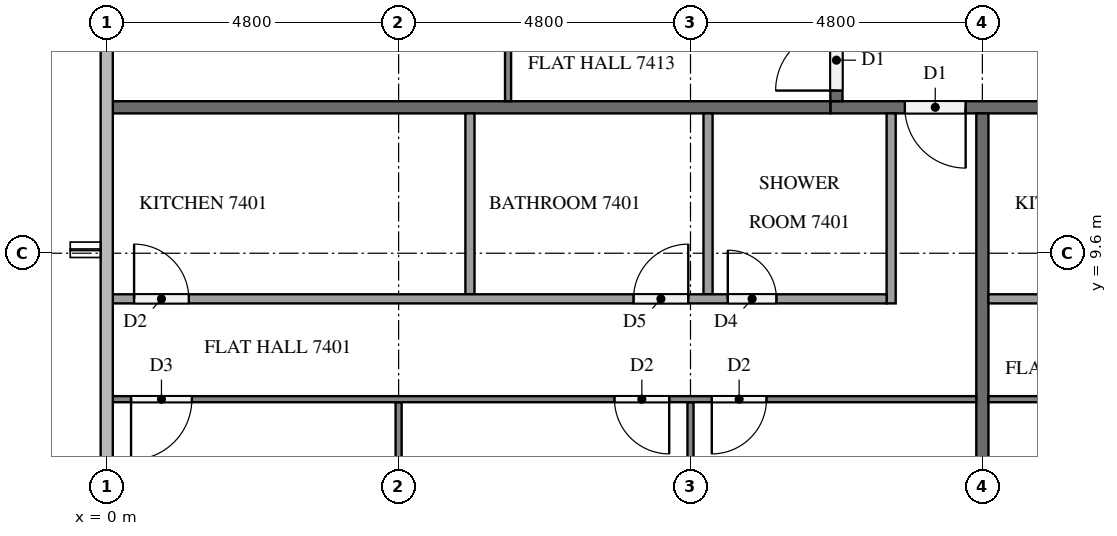
"""IFC4 building model, lengths in metres.
Left out: names, types, materials, properties, quantities, classifications, styles, units other than length and angle.
Written with IfcOpenShell. Run it as: python <this file> out.ifc"""

import sys

from ifc_helpers import new_model, si_unit, direction, frame, frame_2d, origin, place, context, subcontext, project, spatial, rectangle, extrude, element, fill, save


model = new_model("IFC4")
c1 = context("Model", 3, precision=1e-05, world=origin(), true_north=direction((0.0, 1.0)))
c2 = subcontext(c1, "Body", "Model", "MODEL_VIEW")
j1 = project(units=[si_unit("LENGTHUNIT", "METRE"), si_unit("PLANEANGLEUNIT", "RADIAN")], contexts=[c1])
p1 = place(None, origin())
s1 = spatial("IfcSite", under=j1, at=p1, CompositionType="ELEMENT")
p2 = place(p1, origin())
s2 = spatial("IfcBuilding", under=s1, at=p2, CompositionType="ELEMENT")
p3 = place(p2, frame((0.0, 0.0, 282.6)))
s3 = spatial("IfcBuildingStorey", under=s2, at=p3, CompositionType="ELEMENT", Elevation=282.6)
p4 = place(p3, frame((50.5, 12.0, 0.0), z_axis=(0.0, 0.0, 1.0), x_axis=(-1.0, 0.0, 0.0)))
e1 = element("IfcWall", 1, at=p4, inside=s3, PredefinedType="PARTITIONING", context=c2, shape_type="SweptSolid", body=[
    extrude(rectangle(XDim=38.6, YDim=0.2, at=frame_2d((19.3, 0.0))), origin(), (0.0, 0.0, 1.0), 3.2),
])
p5 = place(p4, frame((36.375, 0.0, 0.0)))
e2 = element("IfcOpeningElement", 2, at=p5, cuts=e1, PredefinedType="OPENING", context=c2, shape_type="SweptSolid", body=[
    extrude(rectangle(XDim=1.0, YDim=2.1, at=frame_2d((0.5, 1.05))), frame((0.0, 0.11, 0.0), z_axis=(0.0, -1.0, 0.0), x_axis=(1.0, 0.0, 0.0)), (0.0, 0.0, 1.0), 0.22),
])
p6 = place(p4, frame((29.175, 0.0, 0.0)))
e3 = element("IfcOpeningElement", 3, at=p6, cuts=e1, PredefinedType="OPENING", context=c2, shape_type="SweptSolid", body=[
    extrude(rectangle(XDim=1.0, YDim=2.1, at=frame_2d((0.5, 1.05))), frame((0.0, 0.11, 0.0), z_axis=(0.0, -1.0, 0.0), x_axis=(1.0, 0.0, 0.0)), (0.0, 0.0, 1.0), 0.22),
])
p7 = place(p4, frame((27.625, 0.0, 0.0)))
e4 = element("IfcOpeningElement", 4, at=p7, cuts=e1, PredefinedType="OPENING", context=c2, shape_type="SweptSolid", body=[
    extrude(rectangle(XDim=1.0, YDim=2.1, at=frame_2d((0.5, 1.05))), frame((0.0, 0.11, 0.0), z_axis=(0.0, -1.0, 0.0), x_axis=(1.0, 0.0, 0.0)), (0.0, 0.0, 1.0), 0.22),
])
p8 = place(p4, frame((2.775, 0.0, 0.0)))
e5 = element("IfcOpeningElement", 5, at=p8, cuts=e1, PredefinedType="OPENING", context=c2, shape_type="SweptSolid", body=[
    extrude(rectangle(XDim=1.0, YDim=2.1, at=frame_2d((0.5, 1.05))), frame((0.0, 0.11, 0.0), z_axis=(0.0, -1.0, 0.0), x_axis=(1.0, 0.0, 0.0)), (0.0, 0.0, 1.0), 0.22),
])
p9 = place(p4, frame((1.225, 0.0, 0.0)))
e6 = element("IfcOpeningElement", 6, at=p9, cuts=e1, PredefinedType="OPENING", context=c2, shape_type="SweptSolid", body=[
    extrude(rectangle(XDim=1.0, YDim=2.1, at=frame_2d((0.5, 1.05))), frame((0.0, 0.11, 0.0), z_axis=(0.0, -1.0, 0.0), x_axis=(1.0, 0.0, 0.0)), (0.0, 0.0, 1.0), 0.22),
])
p10 = place(p3, frame((12.0, 12.1, 0.0), z_axis=(0.0, 0.0, 1.0), x_axis=(0.0, 1.0, 0.0)))
e7 = element("IfcWall", 7, at=p10, inside=s3, PredefinedType="PARTITIONING", context=c2, shape_type="SweptSolid", body=[
    extrude(rectangle(XDim=28.6, YDim=0.2, at=frame_2d((14.3, 0.0))), origin(), (0.0, 0.0, 1.0), 3.2),
])
p11 = place(p10, frame((16.975, 0.0, 0.0)))
e8 = element("IfcOpeningElement", 8, at=p11, cuts=e7, PredefinedType="OPENING", context=c2, shape_type="SweptSolid", body=[
    extrude(rectangle(XDim=1.0, YDim=2.1, at=frame_2d((0.5, 1.05))), frame((0.0, 0.11, 0.0), z_axis=(0.0, -1.0, 0.0), x_axis=(1.0, 0.0, 0.0)), (0.0, 0.0, 1.0), 0.22),
])
p12 = place(p10, frame((0.175, 0.0, 0.0)))
e9 = element("IfcOpeningElement", 9, at=p12, cuts=e7, PredefinedType="OPENING", context=c2, shape_type="SweptSolid", body=[
    extrude(rectangle(XDim=1.0, YDim=2.1, at=frame_2d((0.5, 1.05))), frame((0.0, 0.11, 0.0), z_axis=(0.0, -1.0, 0.0), x_axis=(1.0, 0.0, 0.0)), (0.0, 0.0, 1.0), 0.22),
])
p13 = place(p3, frame((14.4, 11.9, 0.0), z_axis=(0.0, 0.0, 1.0), x_axis=(0.0, -1.0, 0.0)))
e10 = element("IfcWall", 10, at=p13, inside=s3, PredefinedType="PARTITIONING", context=c2, shape_type="SweptSolid", body=[
    extrude(rectangle(XDim=11.65, YDim=0.2, at=frame_2d((5.825, 0.0))), origin(), (0.0, 0.0, 1.0), 3.2),
])
p14 = place(p3, frame((0.1, 12.0, 0.0), z_axis=(0.0, 0.0, 1.0), x_axis=(1.0, 0.0, 0.0)))
e11 = element("IfcWall", 11, at=p14, inside=s3, PredefinedType="PARTITIONING", context=c2, shape_type="SweptSolid", body=[
    extrude(rectangle(XDim=11.8, YDim=0.2, at=frame_2d((5.9, 0.0))), origin(), (0.0, 0.0, 1.0), 3.2),
])
p15 = place(p3, frame((9.6, 7.15, 0.0), z_axis=(0.0, 0.0, 1.0), x_axis=(0.0, -1.0, 0.0)))
e12 = element("IfcWall", 12, at=p15, inside=s3, PredefinedType="PARTITIONING", context=c2, shape_type="SweptSolid", body=[
    extrude(rectangle(XDim=7.05, YDim=0.1, at=frame_2d((3.525, 0.0))), origin(), (0.0, 0.0, 1.0), 3.2),
])
p16 = place(p3, frame((4.8, 7.15, 0.0), z_axis=(0.0, 0.0, 1.0), x_axis=(0.0, -1.0, 0.0)))
e13 = element("IfcWall", 13, at=p16, inside=s3, PredefinedType="PARTITIONING", context=c2, shape_type="SweptSolid", body=[
    extrude(rectangle(XDim=6.85, YDim=0.1, at=frame_2d((3.425, 0.0))), origin(), (0.0, 0.0, 1.0), 3.2),
])
p17 = place(p3, frame((14.3, 7.2, 0.0), z_axis=(0.0, 0.0, 1.0), x_axis=(-1.0, 0.0, 0.0)))
e14 = element("IfcWall", 14, at=p17, inside=s3, PredefinedType="PARTITIONING", context=c2, shape_type="SweptSolid", body=[
    extrude(rectangle(XDim=14.2, YDim=0.1, at=frame_2d((7.1, 0.0))), origin(), (0.0, 0.0, 1.0), 3.2),
])
p18 = place(p17, frame((3.45, 0.0, 0.0)))
e15 = element("IfcOpeningElement", 15, at=p18, cuts=e14, PredefinedType="OPENING", context=c2, shape_type="SweptSolid", body=[
    extrude(rectangle(XDim=0.9, YDim=2.1, at=frame_2d((0.45, 1.05))), frame((0.0, 0.06, 0.0), z_axis=(0.0, -1.0, 0.0), x_axis=(1.0, 0.0, 0.0)), (0.0, 0.0, 1.0), 0.12),
])
p19 = place(p17, frame((5.05, 0.0, 0.0)))
e16 = element("IfcOpeningElement", 16, at=p19, cuts=e14, PredefinedType="OPENING", context=c2, shape_type="SweptSolid", body=[
    extrude(rectangle(XDim=0.9, YDim=2.1, at=frame_2d((0.45, 1.05))), frame((0.0, 0.06, 0.0), z_axis=(0.0, -1.0, 0.0), x_axis=(1.0, 0.0, 0.0)), (0.0, 0.0, 1.0), 0.12),
])
p20 = place(p17, frame((12.9, 0.0, 0.0)))
e17 = element("IfcOpeningElement", 17, at=p20, cuts=e14, PredefinedType="OPENING", context=c2, shape_type="SweptSolid", body=[
    extrude(rectangle(XDim=1.0, YDim=2.1, at=frame_2d((0.5, 1.05))), frame((0.0, 0.06, 0.0), z_axis=(0.0, -1.0, 0.0), x_axis=(1.0, 0.0, 0.0)), (0.0, 0.0, 1.0), 0.12),
])
for number, where, z_axis, x_axis in (
    (18, (9.888, 11.9, 0.0), (0.0, 0.0, 1.0), (0.0, -1.0, 0.0)),
    (19, (5.973, 11.9, 0.0), (0.0, 0.0, 1.0), (0.0, -1.0, 0.0)),
):
    element("IfcWall", number, at=place(p3, frame(where, z_axis=z_axis, x_axis=x_axis)), inside=s3, PredefinedType="PARTITIONING", context=c2, shape_type="SweptSolid", body=[
        extrude(rectangle(XDim=2.975, YDim=0.15, at=frame_2d((1.487, 0.0))), origin(), (0.0, 0.0, 1.0), 3.2),
    ])
p21 = place(p3, frame((12.9, 11.9, 0.0), z_axis=(0.0, 0.0, 1.0), x_axis=(0.0, -1.0, 0.0)))
e20 = element("IfcWall", 20, at=p21, inside=s3, PredefinedType="PARTITIONING", context=c2, shape_type="SweptSolid", body=[
    extrude(rectangle(XDim=3.125, YDim=0.15, at=frame_2d((1.562, 0.0))), origin(), (0.0, 0.0, 1.0), 3.2),
])
p22 = place(p3, frame((0.1, 8.85, 0.0), z_axis=(0.0, 0.0, 1.0), x_axis=(1.0, 0.0, 0.0)))
e21 = element("IfcWall", 21, at=p22, inside=s3, PredefinedType="PARTITIONING", context=c2, shape_type="SweptSolid", body=[
    extrude(rectangle(XDim=12.725, YDim=0.15, at=frame_2d((6.362, 0.0))), origin(), (0.0, 0.0, 1.0), 3.2),
])
p23 = place(p22, frame((10.114, 0.0, 0.0)))
e22 = element("IfcOpeningElement", 22, at=p23, cuts=e21, PredefinedType="OPENING", context=c2, shape_type="SweptSolid", body=[
    extrude(rectangle(XDim=0.8, YDim=2.1, at=frame_2d((0.4, 1.05))), frame((0.0, 0.085, 0.0), z_axis=(0.0, -1.0, 0.0), x_axis=(1.0, 0.0, 0.0)), (0.0, 0.0, 1.0), 0.17),
])
p24 = place(p22, frame((8.563, 0.0, 0.0)))
e23 = element("IfcOpeningElement", 23, at=p24, cuts=e21, PredefinedType="OPENING", context=c2, shape_type="SweptSolid", body=[
    extrude(rectangle(XDim=0.9, YDim=2.1, at=frame_2d((0.45, 1.05))), frame((0.0, 0.085, 0.0), z_axis=(0.0, -1.0, 0.0), x_axis=(1.0, 0.0, 0.0)), (0.0, 0.0, 1.0), 0.17),
])
p25 = place(p22, frame((0.35, 0.0, 0.0)))
e24 = element("IfcOpeningElement", 24, at=p25, cuts=e21, PredefinedType="OPENING", context=c2, shape_type="SweptSolid", body=[
    extrude(rectangle(XDim=0.9, YDim=2.1, at=frame_2d((0.45, 1.05))), frame((0.0, 0.085, 0.0), z_axis=(0.0, -1.0, 0.0), x_axis=(1.0, 0.0, 0.0)), (0.0, 0.0, 1.0), 0.17),
])
p26 = place(p3, frame((21.5, 7.2, 0.0), z_axis=(0.0, 0.0, 1.0), x_axis=(-1.0, 0.0, 0.0)))
e25 = element("IfcWall", 25, at=p26, inside=s3, PredefinedType="PARTITIONING", context=c2, shape_type="SweptSolid", body=[
    extrude(rectangle(XDim=7.0, YDim=0.1, at=frame_2d((3.5, 0.0))), origin(), (0.0, 0.0, 1.0), 3.2),
])
p27 = place(p26, frame((0.3, 0.0, 0.0)))
e26 = element("IfcOpeningElement", 26, at=p27, cuts=e25, PredefinedType="OPENING", context=c2, shape_type="SweptSolid", body=[
    extrude(rectangle(XDim=1.0, YDim=2.1, at=frame_2d((0.5, 1.05))), frame((0.0, 0.06, 0.0), z_axis=(0.0, -1.0, 0.0), x_axis=(1.0, 0.0, 0.0)), (0.0, 0.0, 1.0), 0.12),
])
p28 = place(p3, frame((14.5, 8.85, 0.0), z_axis=(0.0, 0.0, 1.0), x_axis=(1.0, 0.0, 0.0)))
e27 = element("IfcWall", 27, at=p28, inside=s3, PredefinedType="PARTITIONING", context=c2, shape_type="SweptSolid", body=[
    extrude(rectangle(XDim=5.525, YDim=0.15, at=frame_2d((2.762, 0.0))), origin(), (0.0, 0.0, 1.0), 3.2),
])
p29 = place(p28, frame((3.64, 0.0, 0.0)))
e28 = element("IfcOpeningElement", 28, at=p29, cuts=e27, PredefinedType="OPENING", context=c2, shape_type="SweptSolid", body=[
    extrude(rectangle(XDim=0.8, YDim=2.1, at=frame_2d((0.4, 1.05))), frame((0.0, 0.085, 0.0), z_axis=(0.0, -1.0, 0.0), x_axis=(1.0, 0.0, 0.0)), (0.0, 0.0, 1.0), 0.17),
])
p30 = place(p28, frame((2.09, 0.0, 0.0)))
e29 = element("IfcOpeningElement", 29, at=p30, cuts=e27, PredefinedType="OPENING", context=c2, shape_type="SweptSolid", body=[
    extrude(rectangle(XDim=0.9, YDim=2.1, at=frame_2d((0.45, 1.05))), frame((0.0, 0.085, 0.0), z_axis=(0.0, -1.0, 0.0), x_axis=(1.0, 0.0, 0.0)), (0.0, 0.0, 1.0), 0.17),
])
p31 = place(p3, frame((6.6, 12.1, 0.0), z_axis=(0.0, 0.0, 1.0), x_axis=(0.0, 1.0, 0.0)))
e30 = element("IfcWall", 30, at=p31, inside=s3, PredefinedType="PARTITIONING", context=c2, shape_type="SweptSolid", body=[
    extrude(rectangle(XDim=16.6, YDim=0.1, at=frame_2d((8.3, 0.0))), origin(), (0.0, 0.0, 1.0), 3.2),
])
p32 = place(p31, frame((3.45, 0.0, 0.0)))
e31 = element("IfcOpeningElement", 31, at=p32, cuts=e30, PredefinedType="OPENING", context=c2, shape_type="SweptSolid", body=[
    extrude(rectangle(XDim=0.9, YDim=2.1, at=frame_2d((0.45, 1.05))), frame((0.0, 0.06, 0.0), z_axis=(0.0, -1.0, 0.0), x_axis=(1.0, 0.0, 0.0)), (0.0, 0.0, 1.0), 0.12),
])
p33 = place(p31, frame((5.05, 0.0, 0.0)))
e32 = element("IfcOpeningElement", 32, at=p33, cuts=e30, PredefinedType="OPENING", context=c2, shape_type="SweptSolid", body=[
    extrude(rectangle(XDim=1.0, YDim=2.1, at=frame_2d((0.5, 1.05))), frame((0.0, 0.06, 0.0), z_axis=(0.0, -1.0, 0.0), x_axis=(1.0, 0.0, 0.0)), (0.0, 0.0, 1.0), 0.12),
])
p34 = place(p31, frame((15.4, 0.0, 0.0)))
e33 = element("IfcOpeningElement", 33, at=p34, cuts=e30, PredefinedType="OPENING", context=c2, shape_type="SweptSolid", body=[
    extrude(rectangle(XDim=0.9, YDim=2.1, at=frame_2d((0.45, 1.05))), frame((0.0, 0.06, 0.0), z_axis=(0.0, -1.0, 0.0), x_axis=(1.0, 0.0, 0.0)), (0.0, 0.0, 1.0), 0.12),
])
p35 = place(p5, origin())
e34 = element("IfcDoor", 34, at=p35, inside=s3, OperationType="SINGLE_SWING_LEFT", PredefinedType="DOOR", context=c2, shape_type="SweptSolid", body=[
    extrude(rectangle(XDim=1.0, YDim=2.1, at=frame_2d((0.5, 1.05))), frame((0.0, 0.025, 0.0), z_axis=(0.0, -1.0, 0.0), x_axis=(1.0, 0.0, 0.0)), (0.0, 0.0, 1.0), 0.05),
])
fill(e2, e34)
p36 = place(p12, origin())
e35 = element("IfcDoor", 35, at=p36, inside=s3, OperationType="SINGLE_SWING_LEFT", PredefinedType="DOOR", context=c2, shape_type="SweptSolid", body=[
    extrude(rectangle(XDim=1.0, YDim=2.1, at=frame_2d((0.5, 1.05))), frame((0.0, 0.025, 0.0), z_axis=(0.0, -1.0, 0.0), x_axis=(1.0, 0.0, 0.0)), (0.0, 0.0, 1.0), 0.05),
])
fill(e9, e35)
p37 = place(p18, origin())
e36 = element("IfcDoor", 36, at=p37, inside=s3, OperationType="SINGLE_SWING_RIGHT", PredefinedType="DOOR", context=c2, shape_type="SweptSolid", body=[
    extrude(rectangle(XDim=0.9, YDim=2.1, at=frame_2d((0.45, 1.05))), frame((0.0, 0.025, 0.0), z_axis=(0.0, -1.0, 0.0), x_axis=(1.0, 0.0, 0.0)), (0.0, 0.0, 1.0), 0.05),
])
fill(e15, e36)
p38 = place(p19, origin())
e37 = element("IfcDoor", 37, at=p38, inside=s3, OperationType="SINGLE_SWING_LEFT", PredefinedType="DOOR", context=c2, shape_type="SweptSolid", body=[
    extrude(rectangle(XDim=0.9, YDim=2.1, at=frame_2d((0.45, 1.05))), frame((0.0, 0.025, 0.0), z_axis=(0.0, -1.0, 0.0), x_axis=(1.0, 0.0, 0.0)), (0.0, 0.0, 1.0), 0.05),
])
fill(e16, e37)
p39 = place(p20, origin())
e38 = element("IfcDoor", 38, at=p39, inside=s3, OperationType="SINGLE_SWING_RIGHT", PredefinedType="DOOR", context=c2, shape_type="SweptSolid", body=[
    extrude(rectangle(XDim=1.0, YDim=2.1, at=frame_2d((0.5, 1.05))), frame((0.0, 0.025, 0.0), z_axis=(0.0, -1.0, 0.0), x_axis=(1.0, 0.0, 0.0)), (0.0, 0.0, 1.0), 0.05),
])
fill(e17, e38)
p40 = place(p23, origin())
e39 = element("IfcDoor", 39, at=p40, inside=s3, OperationType="SINGLE_SWING_LEFT", PredefinedType="DOOR", context=c2, shape_type="SweptSolid", body=[
    extrude(rectangle(XDim=0.8, YDim=2.1, at=frame_2d((0.4, 1.05))), frame((0.0, 0.025, 0.0), z_axis=(0.0, -1.0, 0.0), x_axis=(1.0, 0.0, 0.0)), (0.0, 0.0, 1.0), 0.05),
])
fill(e22, e39)
p41 = place(p24, origin())
e40 = element("IfcDoor", 40, at=p41, inside=s3, OperationType="SINGLE_SWING_RIGHT", PredefinedType="DOOR", context=c2, shape_type="SweptSolid", body=[
    extrude(rectangle(XDim=0.9, YDim=2.1, at=frame_2d((0.45, 1.05))), frame((0.0, 0.025, 0.0), z_axis=(0.0, -1.0, 0.0), x_axis=(1.0, 0.0, 0.0)), (0.0, 0.0, 1.0), 0.05),
])
fill(e23, e40)
p42 = place(p25, origin())
e41 = element("IfcDoor", 41, at=p42, inside=s3, OperationType="SINGLE_SWING_LEFT", PredefinedType="DOOR", context=c2, shape_type="SweptSolid", body=[
    extrude(rectangle(XDim=0.9, YDim=2.1, at=frame_2d((0.45, 1.05))), frame((0.0, 0.025, 0.0), z_axis=(0.0, -1.0, 0.0), x_axis=(1.0, 0.0, 0.0)), (0.0, 0.0, 1.0), 0.05),
])
fill(e24, e41)
save(model, sys.argv[1])
